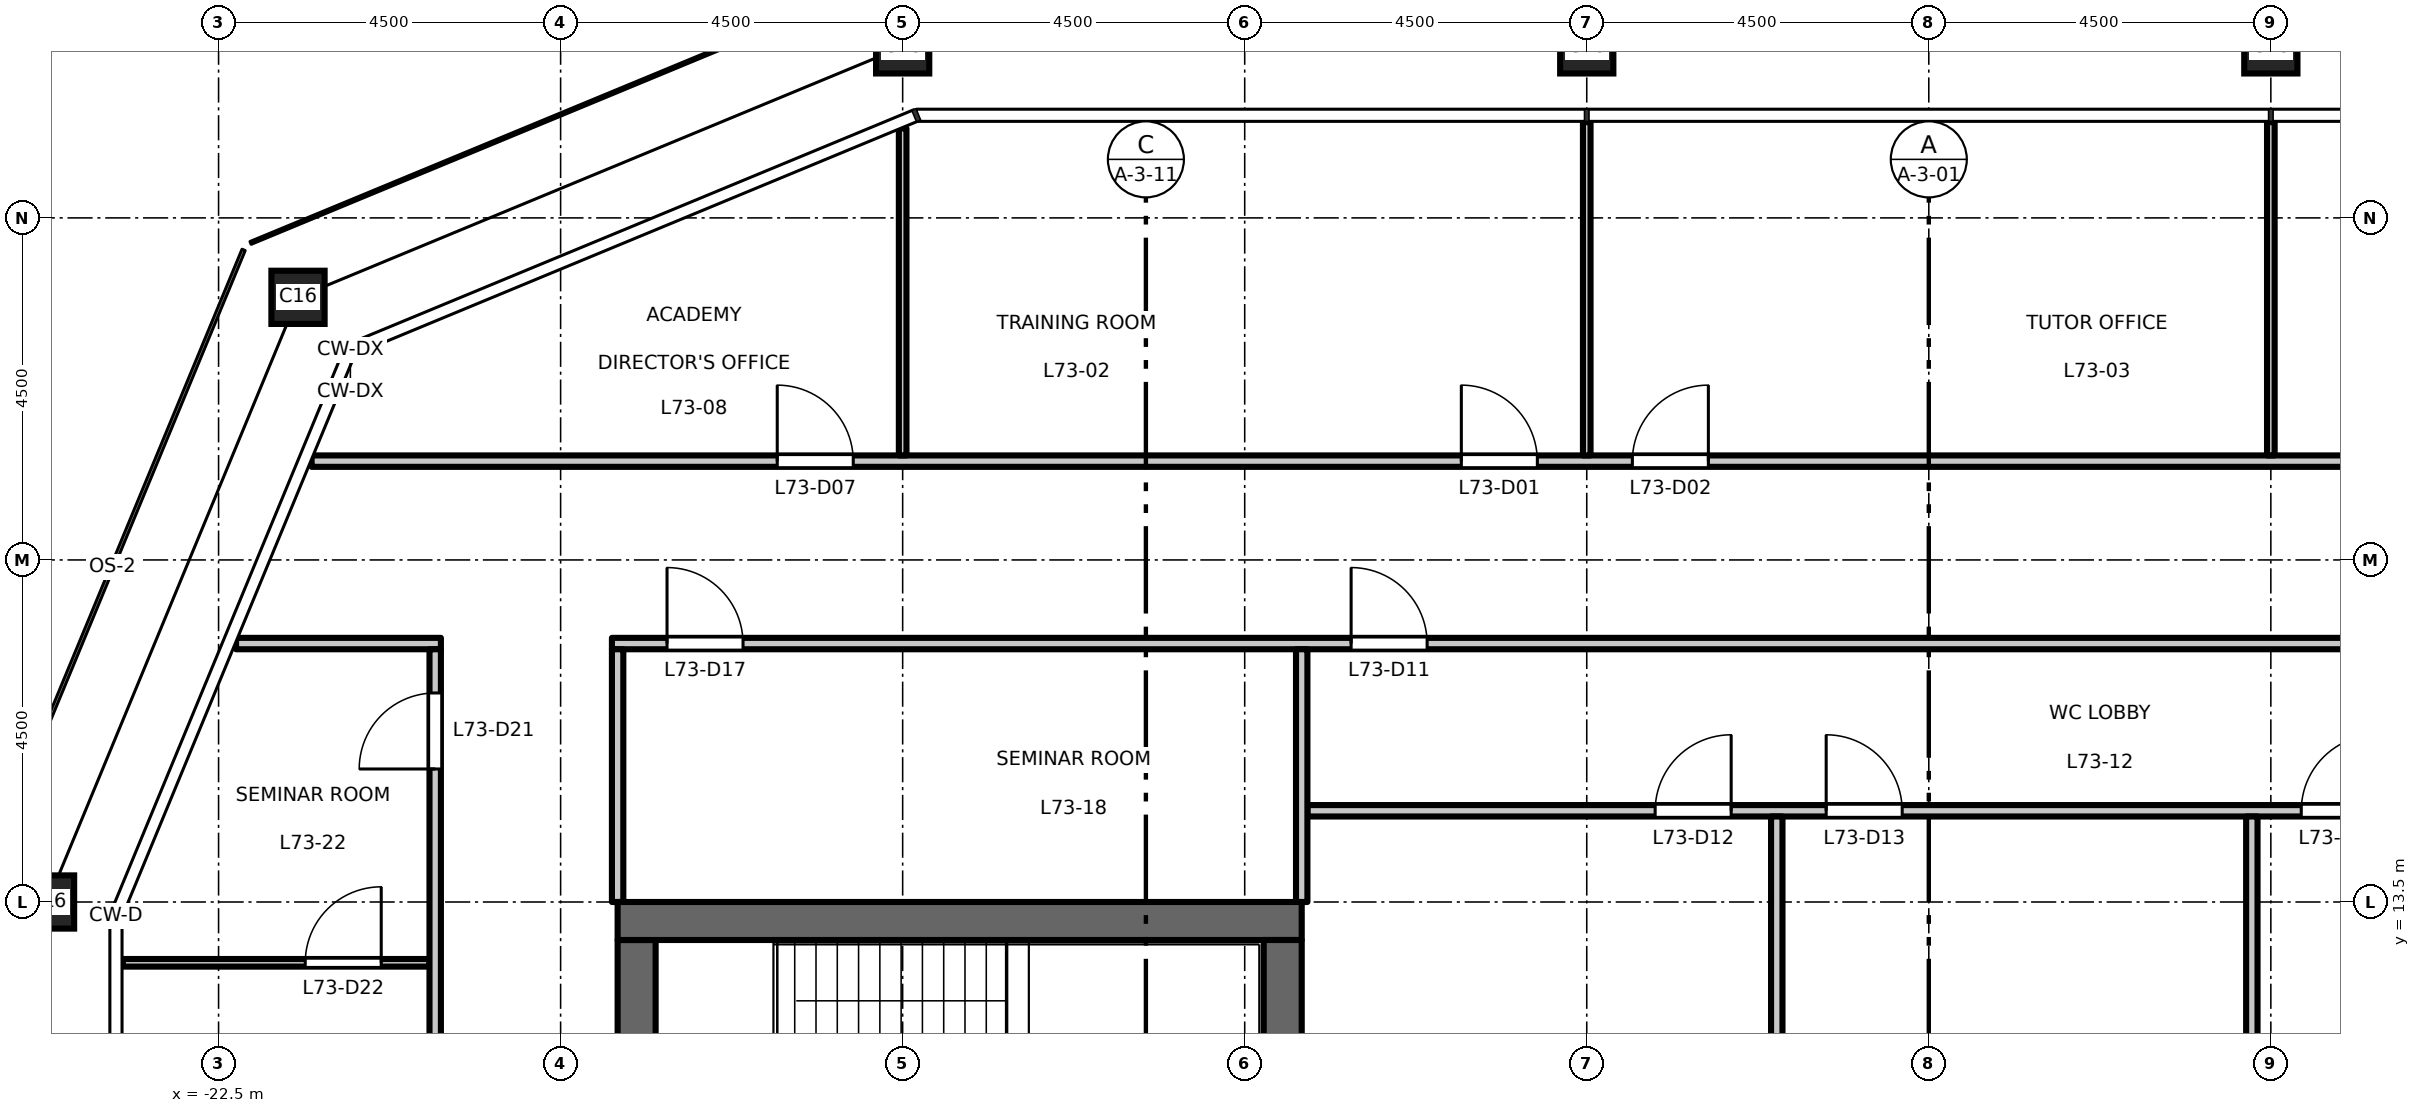
"""IFC4 building model, lengths in metres.
Left out: names, types, materials, properties, quantities, classifications, styles, units other than length and angle.
Written with IfcOpenShell. Run it as: python <this file> out.ifc"""

import sys

from ifc_helpers import new_model, si_unit, direction, frame, frame_2d, origin, origin_2d, place, context, subcontext, project, spatial, rectangle, hollow_rectangle, extrude, element, fill, save


model = new_model("IFC4")
c1 = context("Model", 3, precision=1e-05, world=origin(), true_north=direction((0.0, 1.0)))
c2 = subcontext(c1, "Body", "Model", "MODEL_VIEW")
j1 = project(units=[si_unit("LENGTHUNIT", "METRE"), si_unit("PLANEANGLEUNIT", "RADIAN")], contexts=[c1])
p1 = place(None, origin())
s1 = spatial("IfcSite", under=j1, at=p1, CompositionType="ELEMENT")
p2 = place(p1, origin())
s2 = spatial("IfcBuilding", under=s1, at=p2, CompositionType="ELEMENT")
p3 = place(p2, frame((0.0, 0.0, 339.2)))
s3 = spatial("IfcBuildingStorey", under=s2, at=p3, CompositionType="ELEMENT", Elevation=339.2)
for number, where, z_axis, x_axis in (
    (1, (4.5, 24.75, 0.0), (0.0, 0.0, 1.0), (1.0, 0.0, 0.0)),
    (2, (-4.5, 24.75, 0.0), (0.0, 0.0, 1.0), (1.0, 0.0, 0.0)),
    (3, (-13.5, 24.75, 0.0), (0.0, 0.0, 1.0), (1.0, 0.0, 0.0)),
    (4, (-21.455, 21.455, 0.0), (0.0, 0.0, 1.0), (1.0, 0.0, 0.0)),
    (5, (-24.75, 13.5, 0.0), (0.0, 0.0, 1.0), (1.0, 0.0, 0.0)),
):
    element("IfcColumn", number, at=place(p3, frame(where, z_axis=z_axis, x_axis=x_axis)), inside=s3, PredefinedType="COLUMN", context=c2, shape_type="SweptSolid", body=[
        extrude(hollow_rectangle(XDim=0.7, YDim=0.7, WallThickness=0.036, at=origin_2d()), origin(), (0.0, 0.0, 1.0), 4.5),
    ])
p4 = place(p3, frame((-17.0, -13.0, 0.0), z_axis=(0.0, 0.0, 1.0), x_axis=(0.0, 1.0, 0.0)))
e6 = element("IfcWall", 6, at=p4, inside=s3, PredefinedType="SHEAR", context=c2, shape_type="SweptSolid", body=[
    extrude(rectangle(XDim=26.0, YDim=0.5, at=frame_2d((13.0, 0.0))), origin(), (0.0, 0.0, 1.0), 4.35),
])
p5 = place(p4, frame((16.825, 0.0, 0.0)))
e7 = element("IfcOpeningElement", 7, at=p5, cuts=e6, PredefinedType="OPENING", context=c2, shape_type="SweptSolid", body=[
    extrude(rectangle(XDim=1.8, YDim=2.1, at=frame_2d((0.9, 1.05))), frame((0.0, 0.26, 0.0), z_axis=(0.0, -1.0, 0.0), x_axis=(1.0, 0.0, 0.0)), (0.0, 0.0, 1.0), 0.52),
])
p6 = place(p4, frame((7.375, 0.0, 0.0)))
e8 = element("IfcOpeningElement", 8, at=p6, cuts=e6, PredefinedType="OPENING", context=c2, shape_type="SweptSolid", body=[
    extrude(rectangle(XDim=1.8, YDim=2.1, at=frame_2d((0.9, 1.05))), frame((0.0, 0.26, 0.0), z_axis=(0.0, -1.0, 0.0), x_axis=(1.0, 0.0, 0.0)), (0.0, 0.0, 1.0), 0.52),
])
p7 = place(p3, frame((-8.25, 13.25, 0.0), z_axis=(0.0, 0.0, 1.0), x_axis=(-1.0, 0.0, 0.0)))
e9 = element("IfcWall", 9, at=p7, inside=s3, PredefinedType="SHEAR", context=c2, shape_type="SweptSolid", body=[
    extrude(rectangle(XDim=9.0, YDim=0.5, at=frame_2d((4.5, 0.0))), origin(), (0.0, 0.0, 1.0), 4.35),
])
p8 = place(p3, frame((-8.5, -13.0, 0.0), z_axis=(0.0, 0.0, 1.0), x_axis=(0.0, 1.0, 0.0)))
e10 = element("IfcWall", 10, at=p8, inside=s3, PredefinedType="SHEAR", context=c2, shape_type="SweptSolid", body=[
    extrude(rectangle(XDim=26.0, YDim=0.5, at=frame_2d((13.0, 0.0))), origin(), (0.0, 0.0, 1.0), 4.35),
])
p9 = place(p3, frame((-23.76, 12.7, 0.0), z_axis=(0.0, 0.0, 1.0), x_axis=(1.0, 0.0, 0.0)))
e11 = element("IfcWall", 11, at=p9, inside=s3, PredefinedType="PARTITIONING", context=c2, shape_type="SweptSolid", body=[
    extrude(rectangle(XDim=4.035, YDim=0.1, at=frame_2d((2.018, 0.0))), origin(), (0.0, 0.0, 1.0), 4.35),
])
p10 = place(p9, frame((2.4, 0.0, 0.0)))
e12 = element("IfcOpeningElement", 12, at=p10, cuts=e11, PredefinedType="OPENING", context=c2, shape_type="SweptSolid", body=[
    extrude(rectangle(XDim=1.0, YDim=2.1, at=frame_2d((0.5, 1.05))), frame((0.0, 0.06, 0.0), z_axis=(0.0, -1.0, 0.0), x_axis=(1.0, 0.0, 0.0)), (0.0, 0.0, 1.0), 0.12),
])
p11 = place(p3, frame((-8.175, 14.7, 0.0), z_axis=(0.0, 0.0, 1.0), x_axis=(1.0, 0.0, 0.0)))
e13 = element("IfcWall", 13, at=p11, inside=s3, PredefinedType="PARTITIONING", context=c2, shape_type="SweptSolid", body=[
    extrude(rectangle(XDim=14.975, YDim=0.15, at=frame_2d((7.488, 0.0))), origin(), (0.0, 0.0, 1.0), 4.35),
])
p12 = place(p11, frame((4.575, 0.0, 0.0)))
e14 = element("IfcOpeningElement", 14, at=p12, cuts=e13, PredefinedType="OPENING", context=c2, shape_type="SweptSolid", body=[
    extrude(rectangle(XDim=1.0, YDim=2.1, at=frame_2d((0.5, 1.05))), frame((0.0, 0.085, 0.0), z_axis=(0.0, -1.0, 0.0), x_axis=(1.0, 0.0, 0.0)), (0.0, 0.0, 1.0), 0.17),
])
p13 = place(p11, frame((6.825, 0.0, 0.0)))
e15 = element("IfcOpeningElement", 15, at=p13, cuts=e13, PredefinedType="OPENING", context=c2, shape_type="SweptSolid", body=[
    extrude(rectangle(XDim=1.0, YDim=2.1, at=frame_2d((0.5, 1.05))), frame((0.0, 0.085, 0.0), z_axis=(0.0, -1.0, 0.0), x_axis=(1.0, 0.0, 0.0)), (0.0, 0.0, 1.0), 0.17),
])
p14 = place(p11, frame((13.075, 0.0, 0.0)))
e16 = element("IfcOpeningElement", 16, at=p14, cuts=e13, PredefinedType="OPENING", context=c2, shape_type="SweptSolid", body=[
    extrude(rectangle(XDim=1.0, YDim=2.1, at=frame_2d((0.5, 1.05))), frame((0.0, 0.085, 0.0), z_axis=(0.0, -1.0, 0.0), x_axis=(1.0, 0.0, 0.0)), (0.0, 0.0, 1.0), 0.17),
])
p15 = place(p3, frame((-22.27, 16.9, 0.0), z_axis=(0.0, 0.0, 1.0), x_axis=(1.0, 0.0, 0.0)))
e17 = element("IfcWall", 17, at=p15, inside=s3, PredefinedType="PARTITIONING", context=c2, shape_type="SweptSolid", body=[
    extrude(rectangle(XDim=2.695, YDim=0.15, at=frame_2d((1.348, 0.0))), origin(), (0.0, 0.0, 1.0), 4.35),
])
p16 = place(p3, frame((-17.325, 16.9, 0.0), z_axis=(0.0, 0.0, 1.0), x_axis=(1.0, 0.0, 0.0)))
e18 = element("IfcWall", 18, at=p16, inside=s3, PredefinedType="PARTITIONING", context=c2, shape_type="SweptSolid", body=[
    extrude(rectangle(XDim=34.65, YDim=0.15, at=frame_2d((17.325, 0.0))), origin(), (0.0, 0.0, 1.0), 4.35),
])
p17 = place(p16, frame((9.725, 0.0, 0.0)))
e19 = element("IfcOpeningElement", 19, at=p17, cuts=e18, PredefinedType="OPENING", context=c2, shape_type="SweptSolid", body=[
    extrude(rectangle(XDim=1.0, YDim=2.1, at=frame_2d((0.5, 1.05))), frame((0.0, 0.085, 0.0), z_axis=(0.0, -1.0, 0.0), x_axis=(1.0, 0.0, 0.0)), (0.0, 0.0, 1.0), 0.17),
])
p18 = place(p16, frame((0.725, 0.0, 0.0)))
e20 = element("IfcOpeningElement", 20, at=p18, cuts=e18, PredefinedType="OPENING", context=c2, shape_type="SweptSolid", body=[
    extrude(rectangle(XDim=1.0, YDim=2.1, at=frame_2d((0.5, 1.05))), frame((0.0, 0.085, 0.0), z_axis=(0.0, -1.0, 0.0), x_axis=(1.0, 0.0, 0.0)), (0.0, 0.0, 1.0), 0.17),
])
p19 = place(p16, frame((32.975, 0.0, 0.0)))
e21 = element("IfcOpeningElement", 21, at=p19, cuts=e18, PredefinedType="OPENING", context=c2, shape_type="SweptSolid", body=[
    extrude(rectangle(XDim=1.0, YDim=2.1, at=frame_2d((0.5, 1.05))), frame((0.0, 0.085, 0.0), z_axis=(0.0, -1.0, 0.0), x_axis=(1.0, 0.0, 0.0)), (0.0, 0.0, 1.0), 0.17),
])
p20 = place(p3, frame((-21.276, 19.3, 0.0), z_axis=(0.0, 0.0, 1.0), x_axis=(1.0, 0.0, 0.0)))
e22 = element("IfcWall", 22, at=p20, inside=s3, PredefinedType="PARTITIONING", context=c2, shape_type="SweptSolid", body=[
    extrude(rectangle(XDim=42.552, YDim=0.15, at=frame_2d((21.276, 0.0))), origin(), (0.0, 0.0, 1.0), 4.35),
])
p21 = place(p20, frame((15.126, 0.0, 0.0)))
e23 = element("IfcOpeningElement", 23, at=p21, cuts=e22, PredefinedType="OPENING", context=c2, shape_type="SweptSolid", body=[
    extrude(rectangle(XDim=1.0, YDim=2.1, at=frame_2d((0.5, 1.05))), frame((0.0, 0.085, 0.0), z_axis=(0.0, -1.0, 0.0), x_axis=(1.0, 0.0, 0.0)), (0.0, 0.0, 1.0), 0.17),
])
p22 = place(p20, frame((17.376, 0.0, 0.0)))
e24 = element("IfcOpeningElement", 24, at=p22, cuts=e22, PredefinedType="OPENING", context=c2, shape_type="SweptSolid", body=[
    extrude(rectangle(XDim=1.0, YDim=2.1, at=frame_2d((0.5, 1.05))), frame((0.0, 0.085, 0.0), z_axis=(0.0, -1.0, 0.0), x_axis=(1.0, 0.0, 0.0)), (0.0, 0.0, 1.0), 0.17),
])
p23 = place(p20, frame((33.126, 0.0, 0.0)))
e25 = element("IfcOpeningElement", 25, at=p23, cuts=e22, PredefinedType="OPENING", context=c2, shape_type="SweptSolid", body=[
    extrude(rectangle(XDim=1.0, YDim=2.1, at=frame_2d((0.5, 1.05))), frame((0.0, 0.085, 0.0), z_axis=(0.0, -1.0, 0.0), x_axis=(1.0, 0.0, 0.0)), (0.0, 0.0, 1.0), 0.17),
])
p24 = place(p20, frame((6.126, 0.0, 0.0)))
e26 = element("IfcOpeningElement", 26, at=p24, cuts=e22, PredefinedType="OPENING", context=c2, shape_type="SweptSolid", body=[
    extrude(rectangle(XDim=1.0, YDim=2.1, at=frame_2d((0.5, 1.05))), frame((0.0, 0.085, 0.0), z_axis=(0.0, -1.0, 0.0), x_axis=(1.0, 0.0, 0.0)), (0.0, 0.0, 1.0), 0.17),
])
p25 = place(p20, frame((35.402, 0.0, 0.0)))
e27 = element("IfcOpeningElement", 27, at=p25, cuts=e22, PredefinedType="OPENING", context=c2, shape_type="SweptSolid", body=[
    extrude(rectangle(XDim=1.0, YDim=2.1, at=frame_2d((0.5, 1.05))), frame((0.0, 0.085, 0.0), z_axis=(0.0, -1.0, 0.0), x_axis=(1.0, 0.0, 0.0)), (0.0, 0.0, 1.0), 0.17),
])
p26 = place(p3, frame((-19.65, -16.825, 0.0), z_axis=(0.0, 0.0, 1.0), x_axis=(0.0, 1.0, 0.0)))
e28 = element("IfcWall", 28, at=p26, inside=s3, PredefinedType="PARTITIONING", context=c2, shape_type="SweptSolid", body=[
    extrude(rectangle(XDim=33.65, YDim=0.15, at=frame_2d((16.825, 0.0))), origin(), (0.0, 0.0, 1.0), 4.35),
])
p27 = place(p26, frame((32.075, 0.0, 0.0)))
e29 = element("IfcOpeningElement", 29, at=p27, cuts=e28, PredefinedType="OPENING", context=c2, shape_type="SweptSolid", body=[
    extrude(rectangle(XDim=1.0, YDim=2.1, at=frame_2d((0.5, 1.05))), frame((0.0, 0.085, 0.0), z_axis=(0.0, -1.0, 0.0), x_axis=(1.0, 0.0, 0.0)), (0.0, 0.0, 1.0), 0.17),
])
p28 = place(p3, frame((-17.25, 13.5, 0.0), z_axis=(0.0, 0.0, 1.0), x_axis=(0.0, 1.0, 0.0)))
e30 = element("IfcWall", 30, at=p28, inside=s3, PredefinedType="PARTITIONING", context=c2, shape_type="SweptSolid", body=[
    extrude(rectangle(XDim=3.325, YDim=0.15, at=frame_2d((1.663, 0.0))), origin(), (0.0, 0.0, 1.0), 4.35),
])
p29 = place(p3, frame((-13.5, 19.375, 0.0), z_axis=(0.0, 0.0, 1.0), x_axis=(0.0, 1.0, 0.0)))
e31 = element("IfcWall", 31, at=p29, inside=s3, PredefinedType="PARTITIONING", context=c2, shape_type="SweptSolid", body=[
    extrude(rectangle(XDim=4.303, YDim=0.1, at=frame_2d((2.151, 0.0))), origin(), (0.0, 0.0, 1.0), 3.75),
])
p30 = place(p3, frame((-8.25, 13.5, 0.0), z_axis=(0.0, 0.0, 1.0), x_axis=(0.0, 1.0, 0.0)))
e32 = element("IfcWall", 32, at=p30, inside=s3, PredefinedType="PARTITIONING", context=c2, shape_type="SweptSolid", body=[
    extrude(rectangle(XDim=3.325, YDim=0.15, at=frame_2d((1.663, 0.0))), origin(), (0.0, 0.0, 1.0), 4.35),
])
p31 = place(p3, frame((-4.5, 19.375, 0.0), z_axis=(0.0, 0.0, 1.0), x_axis=(0.0, 1.0, 0.0)))
e33 = element("IfcWall", 33, at=p31, inside=s3, PredefinedType="PARTITIONING", context=c2, shape_type="SweptSolid", body=[
    extrude(rectangle(XDim=4.385, YDim=0.1, at=frame_2d((2.192, 0.0))), origin(), (0.0, 0.0, 1.0), 3.65),
])
for number, where, z_axis, x_axis in (
    (34, (-2.0, 8.37, 0.0), (0.0, 0.0, 1.0), (0.0, 1.0, 0.0)),
    (35, (4.25, 8.37, 0.0), (0.0, 0.0, 1.0), (0.0, 1.0, 0.0)),
):
    element("IfcWall", number, at=place(p3, frame(where, z_axis=z_axis, x_axis=x_axis)), inside=s3, PredefinedType="PARTITIONING", context=c2, shape_type="SweptSolid", body=[
        extrude(rectangle(XDim=6.255, YDim=0.15, at=frame_2d((3.127, 0.0))), origin(), (0.0, 0.0, 1.0), 4.35),
    ])
p32 = place(p3, frame((4.5, 19.375, 0.0), z_axis=(0.0, 0.0, 1.0), x_axis=(0.0, 1.0, 0.0)))
e36 = element("IfcWall", 36, at=p32, inside=s3, PredefinedType="PARTITIONING", context=c2, shape_type="SweptSolid", body=[
    extrude(rectangle(XDim=4.385, YDim=0.1, at=frame_2d((2.192, 0.0))), origin(), (0.0, 0.0, 1.0), 3.65),
])
p33 = place(p21, origin())
e37 = element("IfcDoor", 37, at=p33, inside=s3, OperationType="SINGLE_SWING_LEFT", PredefinedType="DOOR", context=c2, shape_type="SweptSolid", body=[
    extrude(rectangle(XDim=1.0, YDim=2.1, at=frame_2d((0.5, 1.05))), frame((0.0, 0.025, 0.0), z_axis=(0.0, -1.0, 0.0), x_axis=(1.0, 0.0, 0.0)), (0.0, 0.0, 1.0), 0.05),
])
fill(e23, e37)
p34 = place(p22, origin())
e38 = element("IfcDoor", 38, at=p34, inside=s3, OperationType="SINGLE_SWING_RIGHT", PredefinedType="DOOR", context=c2, shape_type="SweptSolid", body=[
    extrude(rectangle(XDim=1.0, YDim=2.1, at=frame_2d((0.5, 1.05))), frame((0.0, 0.025, 0.0), z_axis=(0.0, -1.0, 0.0), x_axis=(1.0, 0.0, 0.0)), (0.0, 0.0, 1.0), 0.05),
])
fill(e24, e38)
p35 = place(p24, origin())
e39 = element("IfcDoor", 39, at=p35, inside=s3, OperationType="SINGLE_SWING_LEFT", PredefinedType="DOOR", context=c2, shape_type="SweptSolid", body=[
    extrude(rectangle(XDim=1.0, YDim=2.1, at=frame_2d((0.5, 1.05))), frame((0.0, 0.025, 0.0), z_axis=(0.0, -1.0, 0.0), x_axis=(1.0, 0.0, 0.0)), (0.0, 0.0, 1.0), 0.05),
])
fill(e26, e39)
p36 = place(p17, origin())
e40 = element("IfcDoor", 40, at=p36, inside=s3, OperationType="SINGLE_SWING_LEFT", PredefinedType="DOOR", context=c2, shape_type="SweptSolid", body=[
    extrude(rectangle(XDim=1.0, YDim=2.1, at=frame_2d((0.5, 1.05))), frame((0.0, 0.025, 0.0), z_axis=(0.0, -1.0, 0.0), x_axis=(1.0, 0.0, 0.0)), (0.0, 0.0, 1.0), 0.05),
])
fill(e19, e40)
p37 = place(p12, origin())
e41 = element("IfcDoor", 41, at=p37, inside=s3, OperationType="SINGLE_SWING_RIGHT", PredefinedType="DOOR", context=c2, shape_type="SweptSolid", body=[
    extrude(rectangle(XDim=1.0, YDim=2.1, at=frame_2d((0.5, 1.05))), frame((0.0, 0.025, 0.0), z_axis=(0.0, -1.0, 0.0), x_axis=(1.0, 0.0, 0.0)), (0.0, 0.0, 1.0), 0.05),
])
fill(e14, e41)
p38 = place(p13, origin())
e42 = element("IfcDoor", 42, at=p38, inside=s3, OperationType="SINGLE_SWING_LEFT", PredefinedType="DOOR", context=c2, shape_type="SweptSolid", body=[
    extrude(rectangle(XDim=1.0, YDim=2.1, at=frame_2d((0.5, 1.05))), frame((0.0, 0.025, 0.0), z_axis=(0.0, -1.0, 0.0), x_axis=(1.0, 0.0, 0.0)), (0.0, 0.0, 1.0), 0.05),
])
fill(e15, e42)
p39 = place(p14, origin())
e43 = element("IfcDoor", 43, at=p39, inside=s3, OperationType="SINGLE_SWING_RIGHT", PredefinedType="DOOR", context=c2, shape_type="SweptSolid", body=[
    extrude(rectangle(XDim=1.0, YDim=2.1, at=frame_2d((0.5, 1.05))), frame((0.0, 0.025, 0.0), z_axis=(0.0, -1.0, 0.0), x_axis=(1.0, 0.0, 0.0)), (0.0, 0.0, 1.0), 0.05),
])
fill(e16, e43)
p40 = place(p18, origin())
e44 = element("IfcDoor", 44, at=p40, inside=s3, OperationType="SINGLE_SWING_LEFT", PredefinedType="DOOR", context=c2, shape_type="SweptSolid", body=[
    extrude(rectangle(XDim=1.0, YDim=2.1, at=frame_2d((0.5, 1.05))), frame((0.0, 0.025, 0.0), z_axis=(0.0, -1.0, 0.0), x_axis=(1.0, 0.0, 0.0)), (0.0, 0.0, 1.0), 0.05),
])
fill(e20, e44)
p41 = place(p27, origin())
e45 = element("IfcDoor", 45, at=p41, inside=s3, OperationType="SINGLE_SWING_LEFT", PredefinedType="DOOR", context=c2, shape_type="SweptSolid", body=[
    extrude(rectangle(XDim=1.0, YDim=2.1, at=frame_2d((0.5, 1.05))), frame((0.0, 0.025, 0.0), z_axis=(0.0, -1.0, 0.0), x_axis=(1.0, 0.0, 0.0)), (0.0, 0.0, 1.0), 0.05),
])
fill(e29, e45)
p42 = place(p10, origin())
e46 = element("IfcDoor", 46, at=p42, inside=s3, OperationType="SINGLE_SWING_RIGHT", PredefinedType="DOOR", context=c2, shape_type="SweptSolid", body=[
    extrude(rectangle(XDim=1.0, YDim=2.1, at=frame_2d((0.5, 1.05))), frame((0.0, 0.025, 0.0), z_axis=(0.0, -1.0, 0.0), x_axis=(1.0, 0.0, 0.0)), (0.0, 0.0, 1.0), 0.05),
])
fill(e12, e46)
save(model, sys.argv[1])
